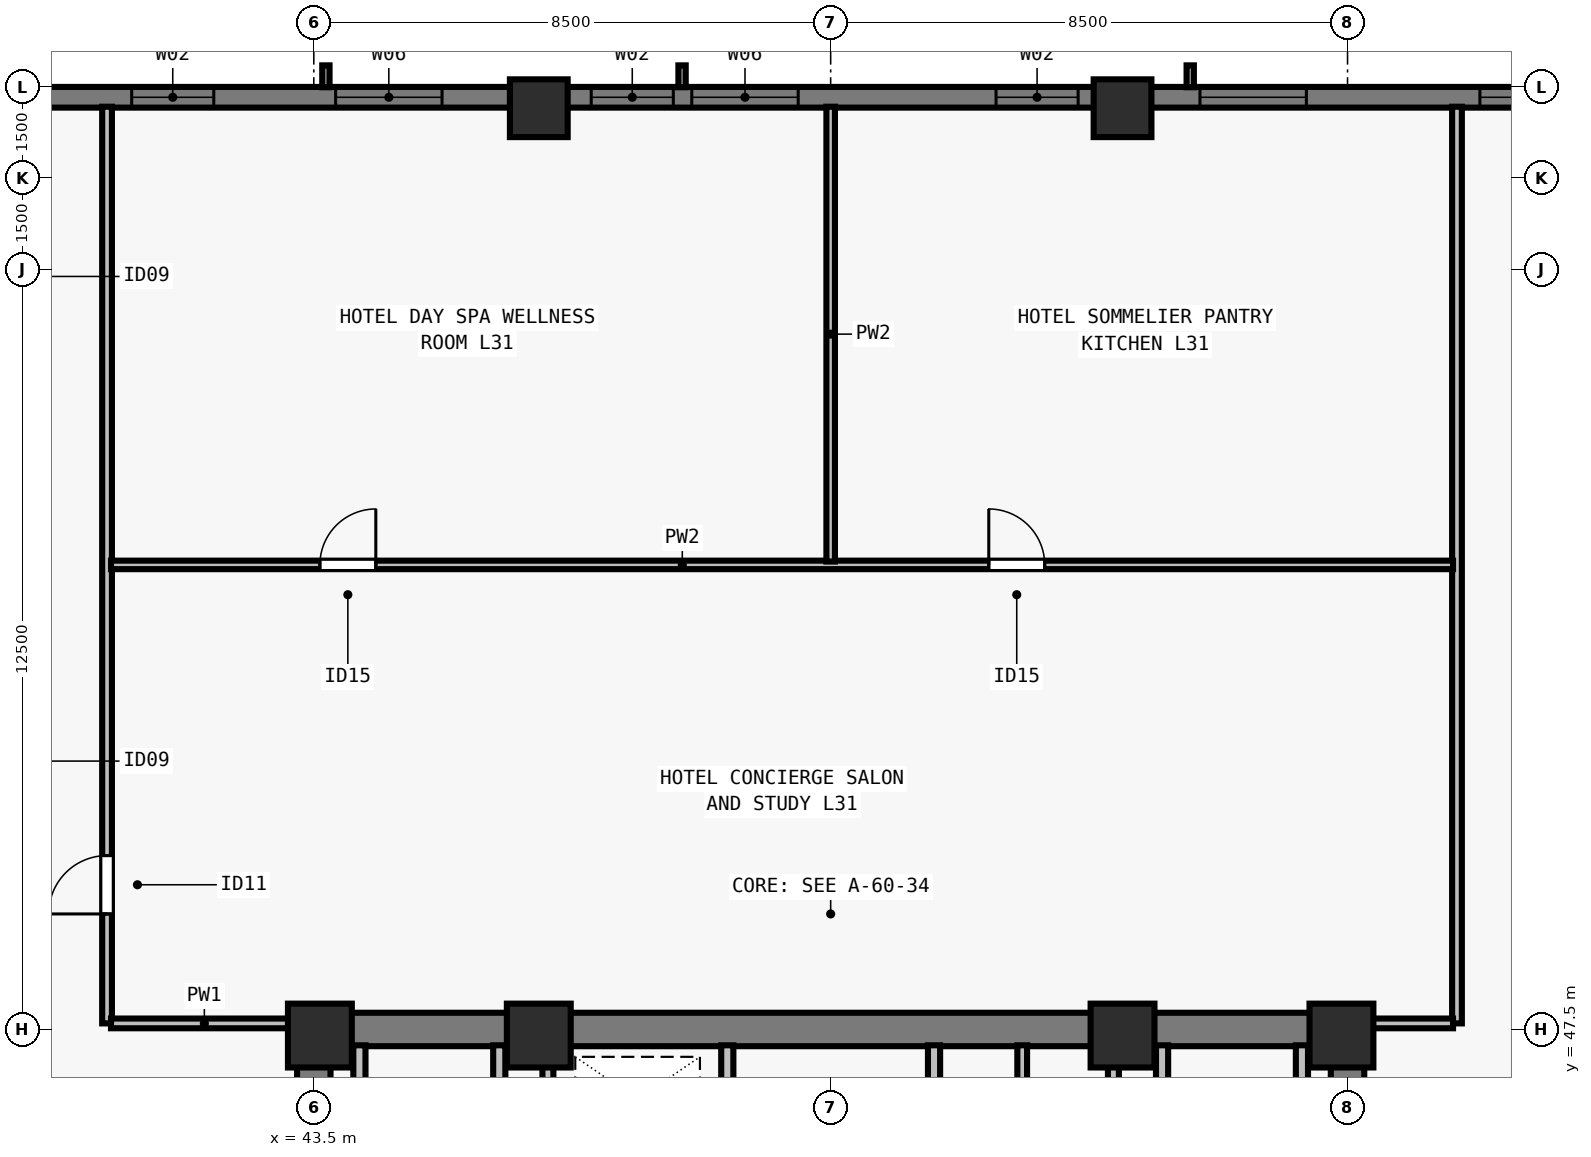
"""IFC4 building model, lengths in metres.
Left out: names, types, materials, properties, quantities, classifications, styles, units other than length and angle.
Written with IfcOpenShell. Run it as: python <this file> out.ifc"""

import sys

from ifc_helpers import new_model, si_unit, direction, frame, frame_2d, origin, origin_2d, place, context, subcontext, project, spatial, rectangle, extrude, element, fill, save


model = new_model("IFC4")
c1 = context("Model", 3, precision=1e-05, world=origin(), true_north=direction((0.0, 1.0)))
c2 = subcontext(c1, "Body", "Model", "MODEL_VIEW")
j1 = project(units=[si_unit("LENGTHUNIT", "METRE"), si_unit("PLANEANGLEUNIT", "RADIAN")], contexts=[c1])
p1 = place(None, origin())
s1 = spatial("IfcSite", under=j1, at=p1, CompositionType="ELEMENT")
p2 = place(p1, origin())
s2 = spatial("IfcBuilding", under=s1, at=p2, CompositionType="ELEMENT")
p3 = place(p2, frame((0.0, 0.0, 116.5)))
s3 = spatial("IfcBuildingStorey", under=s2, at=p3, CompositionType="ELEMENT", Elevation=116.5)
for number, where, z_axis, x_axis in (
    (1, (43.6, 47.4, 0.0), (0.0, 0.0, 1.0), (1.0, 0.0, 0.0)),
    (2, (47.2, 47.4, 0.0), (0.0, 0.0, 1.0), (1.0, 0.0, 0.0)),
    (3, (56.8, 47.4, 0.0), (0.0, 0.0, 1.0), (1.0, 0.0, 0.0)),
    (4, (60.4, 47.4, 0.0), (0.0, 0.0, 1.0), (1.0, 0.0, 0.0)),
):
    element("IfcColumn", number, at=place(p3, frame(where, z_axis=z_axis, x_axis=x_axis)), inside=s3, PredefinedType="COLUMN", context=c2, shape_type="SweptSolid", body=[
        extrude(rectangle(XDim=1.05, YDim=1.05, at=origin_2d()), origin(), (0.0, 0.0, 1.0), 3.5),
    ])
for number, where, z_axis, x_axis in (
    (5, (56.8, 62.65, 0.0), (0.0, 0.0, 1.0), (1.0, 0.0, 0.0)),
    (6, (47.2, 62.65, 0.0), (0.0, 0.0, 1.0), (1.0, 0.0, 0.0)),
):
    element("IfcColumn", number, at=place(p3, frame(where, z_axis=z_axis, x_axis=x_axis)), inside=s3, PredefinedType="COLUMN", context=c2, shape_type="SweptSolid", body=[
        extrude(rectangle(XDim=0.95, YDim=0.95, at=origin_2d()), origin(), (0.0, 0.0, 1.0), 3.5),
    ])
p4 = place(p3, frame((32.0, 62.83, 0.0), z_axis=(0.0, 0.0, 1.0), x_axis=(1.0, 0.0, 0.0)))
e7 = element("IfcWall", 7, at=p4, inside=s3, PredefinedType="SOLIDWALL", context=c2, shape_type="SweptSolid", body=[
    extrude(rectangle(XDim=39.682, YDim=0.34, at=frame_2d((19.841, 0.0))), origin(), (0.0, 0.0, 1.0), 3.28),
])
p5 = place(p4, frame((3.902, 0.0, 0.8)))
e8 = element("IfcOpeningElement", 8, at=p5, cuts=e7, PredefinedType="OPENING", context=c2, shape_type="SweptSolid", body=[
    extrude(rectangle(XDim=1.75, YDim=1.66, at=frame_2d((0.875, 0.83))), frame((0.0, 0.18, 0.0), z_axis=(0.0, -1.0, 0.0), x_axis=(1.0, 0.0, 0.0)), (0.0, 0.0, 1.0), 0.36),
])
p6 = place(p4, frame((8.505, 0.0, 0.8)))
e9 = element("IfcOpeningElement", 9, at=p6, cuts=e7, PredefinedType="OPENING", context=c2, shape_type="SweptSolid", body=[
    extrude(rectangle(XDim=1.35, YDim=1.66, at=frame_2d((0.675, 0.83))), frame((0.0, 0.18, 0.0), z_axis=(0.0, -1.0, 0.0), x_axis=(1.0, 0.0, 0.0)), (0.0, 0.0, 1.0), 0.36),
])
p7 = place(p4, frame((11.859, 0.0, 0.8)))
e10 = element("IfcOpeningElement", 10, at=p7, cuts=e7, PredefinedType="OPENING", context=c2, shape_type="SweptSolid", body=[
    extrude(rectangle(XDim=1.75, YDim=1.66, at=frame_2d((0.875, 0.83))), frame((0.0, 0.18, 0.0), z_axis=(0.0, -1.0, 0.0), x_axis=(1.0, 0.0, 0.0)), (0.0, 0.0, 1.0), 0.36),
])
p8 = place(p4, frame((16.062, 0.0, 0.8)))
e11 = element("IfcOpeningElement", 11, at=p8, cuts=e7, PredefinedType="OPENING", context=c2, shape_type="SweptSolid", body=[
    extrude(rectangle(XDim=1.35, YDim=1.66, at=frame_2d((0.675, 0.83))), frame((0.0, 0.18, 0.0), z_axis=(0.0, -1.0, 0.0), x_axis=(1.0, 0.0, 0.0)), (0.0, 0.0, 1.0), 0.36),
])
p9 = place(p4, frame((17.716, 0.0, 0.8)))
e12 = element("IfcOpeningElement", 12, at=p9, cuts=e7, PredefinedType="OPENING", context=c2, shape_type="SweptSolid", body=[
    extrude(rectangle(XDim=1.75, YDim=1.66, at=frame_2d((0.875, 0.83))), frame((0.0, 0.18, 0.0), z_axis=(0.0, -1.0, 0.0), x_axis=(1.0, 0.0, 0.0)), (0.0, 0.0, 1.0), 0.36),
])
p10 = place(p4, frame((22.719, 0.0, 0.8)))
e13 = element("IfcOpeningElement", 13, at=p10, cuts=e7, PredefinedType="OPENING", context=c2, shape_type="SweptSolid", body=[
    extrude(rectangle(XDim=1.35, YDim=1.66, at=frame_2d((0.675, 0.83))), frame((0.0, 0.18, 0.0), z_axis=(0.0, -1.0, 0.0), x_axis=(1.0, 0.0, 0.0)), (0.0, 0.0, 1.0), 0.36),
])
p11 = place(p4, frame((26.073, 0.0, 0.8)))
e14 = element("IfcOpeningElement", 14, at=p11, cuts=e7, PredefinedType="OPENING", context=c2, shape_type="SweptSolid", body=[
    extrude(rectangle(XDim=1.75, YDim=1.66, at=frame_2d((0.875, 0.83))), frame((0.0, 0.18, 0.0), z_axis=(0.0, -1.0, 0.0), x_axis=(1.0, 0.0, 0.0)), (0.0, 0.0, 1.0), 0.36),
])
p12 = place(p4, frame((30.677, 0.0, 0.8)))
e15 = element("IfcOpeningElement", 15, at=p12, cuts=e7, PredefinedType="OPENING", context=c2, shape_type="SweptSolid", body=[
    extrude(rectangle(XDim=1.35, YDim=1.66, at=frame_2d((0.675, 0.83))), frame((0.0, 0.18, 0.0), z_axis=(0.0, -1.0, 0.0), x_axis=(1.0, 0.0, 0.0)), (0.0, 0.0, 1.0), 0.36),
])
p13 = place(p4, frame((33.18, 0.0, 0.8)))
e16 = element("IfcOpeningElement", 16, at=p13, cuts=e7, PredefinedType="OPENING", context=c2, shape_type="SweptSolid", body=[
    extrude(rectangle(XDim=1.75, YDim=1.66, at=frame_2d((0.875, 0.83))), frame((0.0, 0.18, 0.0), z_axis=(0.0, -1.0, 0.0), x_axis=(1.0, 0.0, 0.0)), (0.0, 0.0, 1.0), 0.36),
])
p14 = place(p3, frame((43.225, 47.5, 0.0), z_axis=(0.0, 0.0, 1.0), x_axis=(1.0, 0.0, 0.0)))
e17 = element("IfcWall", 17, at=p14, inside=s3, PredefinedType="SHEAR", context=c2, shape_type="SweptSolid", body=[
    extrude(rectangle(XDim=17.55, YDim=0.55, at=frame_2d((8.775, 0.0))), origin(), (0.0, 0.0, 1.0), 3.28),
])
for number, where, z_axis, x_axis in (
    (18, (43.5, 40.8, 0.0), (0.0, 0.0, 1.0), (0.0, 1.0, 0.0)),
    (19, (60.5, 40.8, 0.0), (0.0, 0.0, 1.0), (0.0, 1.0, 0.0)),
):
    element("IfcWall", number, at=place(p3, frame(where, z_axis=z_axis, x_axis=x_axis)), inside=s3, PredefinedType="SHEAR", context=c2, shape_type="SweptSolid", body=[
        extrude(rectangle(XDim=6.435, YDim=0.55, at=frame_2d((3.218, 0.0))), origin(), (0.0, 0.0, 1.0), 3.28),
    ])
p15 = place(p3, frame((50.3, 40.585, 0.0), z_axis=(0.0, 0.0, 1.0), x_axis=(0.0, 1.0, 0.0)))
e20 = element("IfcWall", 20, at=p15, inside=s3, PredefinedType="SOLIDWALL", context=c2, shape_type="SweptSolid", body=[
    extrude(rectangle(XDim=6.655, YDim=0.2, at=frame_2d((3.328, 0.0))), origin(), (0.0, 0.0, 1.0), 3.28),
])
p16 = place(p15, frame((5.065, 0.0, 0.0)))
e21 = element("IfcOpeningElement", 21, at=p16, cuts=e20, PredefinedType="OPENING", context=c2, shape_type="SweptSolid", body=[
    extrude(rectangle(XDim=0.8, YDim=2.08, at=frame_2d((0.4, 1.04))), frame((0.0, 0.11, 0.0), z_axis=(0.0, -1.0, 0.0), x_axis=(1.0, 0.0, 0.0)), (0.0, 0.0, 1.0), 0.22),
])
p17 = place(p3, frame((53.7, 40.585, 0.0), z_axis=(0.0, 0.0, 1.0), x_axis=(0.0, 1.0, 0.0)))
e22 = element("IfcWall", 22, at=p17, inside=s3, PredefinedType="SOLIDWALL", context=c2, shape_type="SweptSolid", body=[
    extrude(rectangle(XDim=6.655, YDim=0.2, at=frame_2d((3.328, 0.0))), origin(), (0.0, 0.0, 1.0), 3.28),
])
p18 = place(p17, frame((0.195, 0.0, 0.0)))
e23 = element("IfcOpeningElement", 23, at=p18, cuts=e22, PredefinedType="OPENING", context=c2, shape_type="SweptSolid", body=[
    extrude(rectangle(XDim=0.8, YDim=2.08, at=frame_2d((0.4, 1.04))), frame((0.0, 0.11, 0.0), z_axis=(0.0, -1.0, 0.0), x_axis=(1.0, 0.0, 0.0)), (0.0, 0.0, 1.0), 0.22),
])
p19 = place(p17, frame((4.265, 0.0, 0.0)))
e24 = element("IfcOpeningElement", 24, at=p19, cuts=e22, PredefinedType="OPENING", context=c2, shape_type="SweptSolid", body=[
    extrude(rectangle(XDim=0.95, YDim=2.12, at=frame_2d((0.475, 1.06))), frame((0.0, 0.11, 0.0), z_axis=(0.0, -1.0, 0.0), x_axis=(1.0, 0.0, 0.0)), (0.0, 0.0, 1.0), 0.22),
])
for number, where, z_axis, x_axis in (
    (25, (46.55, 43.735, 0.0), (0.0, 0.0, 1.0), (0.0, 1.0, 0.0)),
    (26, (44.25, 43.735, 0.0), (0.0, 0.0, 1.0), (0.0, 1.0, 0.0)),
    (27, (57.45, 43.735, 0.0), (0.0, 0.0, 1.0), (0.0, 1.0, 0.0)),
    (28, (59.75, 43.735, 0.0), (0.0, 0.0, 1.0), (0.0, 1.0, 0.0)),
):
    element("IfcWall", number, at=place(p3, frame(where, z_axis=z_axis, x_axis=x_axis)), inside=s3, PredefinedType="SOLIDWALL", context=c2, shape_type="SweptSolid", body=[
        extrude(rectangle(XDim=3.505, YDim=0.2, at=frame_2d((1.752, 0.0))), origin(), (0.0, 0.0, 1.0), 3.28),
    ])
for number, where, z_axis, x_axis in (
    (29, (47.35, 43.735, 0.0), (0.0, 0.0, 1.0), (0.0, 1.0, 0.0)),
    (30, (56.65, 43.735, 0.0), (0.0, 0.0, 1.0), (0.0, 1.0, 0.0)),
):
    element("IfcWall", number, at=place(p3, frame(where, z_axis=z_axis, x_axis=x_axis)), inside=s3, PredefinedType="SOLIDWALL", context=c2, shape_type="SweptSolid", body=[
        extrude(rectangle(XDim=3.505, YDim=0.18, at=frame_2d((1.752, 0.0))), origin(), (0.0, 0.0, 1.0), 3.28),
    ])
p20 = place(p3, frame((55.15, 44.195, 0.0), z_axis=(0.0, 0.0, 1.0), x_axis=(0.0, 1.0, 0.0)))
e31 = element("IfcWall", 31, at=p20, inside=s3, PredefinedType="PARTITIONING", context=c2, shape_type="SweptSolid", body=[
    extrude(rectangle(XDim=3.045, YDim=0.16, at=frame_2d((1.522, 0.0))), origin(), (0.0, 0.0, 1.0), 3.28),
])
p21 = place(p20, frame((1.025, 0.0, 0.0)))
e32 = element("IfcOpeningElement", 32, at=p21, cuts=e31, PredefinedType="OPENING", context=c2, shape_type="SweptSolid", body=[
    extrude(rectangle(XDim=0.8, YDim=2.1, at=frame_2d((0.4, 1.05))), frame((0.0, 0.09, 0.0), z_axis=(0.0, -1.0, 0.0), x_axis=(1.0, 0.0, 0.0)), (0.0, 0.0, 1.0), 0.18),
])
p22 = place(p3, frame((40.1, 47.6, 0.0), z_axis=(0.0, 0.0, 1.0), x_axis=(0.0, 1.0, 0.0)))
e33 = element("IfcWall", 33, at=p22, inside=s3, PredefinedType="PARTITIONING", context=c2, shape_type="SweptSolid", body=[
    extrude(rectangle(XDim=15.075, YDim=0.16, at=frame_2d((7.538, 0.0))), origin(), (0.0, 0.0, 1.0), 2.555),
])
p23 = place(p22, frame((1.8, 0.0, 0.0)))
e34 = element("IfcOpeningElement", 34, at=p23, cuts=e33, PredefinedType="OPENING", context=c2, shape_type="SweptSolid", body=[
    extrude(rectangle(XDim=0.96, YDim=2.12, at=frame_2d((0.48, 1.06))), frame((0.0, 0.09, 0.0), z_axis=(0.0, -1.0, 0.0), x_axis=(1.0, 0.0, 0.0)), (0.0, 0.0, 1.0), 0.18),
])
p24 = place(p3, frame((40.165, 47.6, 0.0), z_axis=(0.0, 0.0, 1.0), x_axis=(1.0, 0.0, 0.0)))
e35 = element("IfcWall", 35, at=p24, inside=s3, PredefinedType="PARTITIONING", context=c2, shape_type="SweptSolid", body=[
    extrude(rectangle(XDim=3.07, YDim=0.16, at=frame_2d((1.535, 0.0))), origin(), (0.0, 0.0, 1.0), 3.28),
])
p25 = place(p3, frame((62.3, 47.6, 0.0), z_axis=(0.0, 0.0, 1.0), x_axis=(0.0, 1.0, 0.0)))
e36 = element("IfcWall", 36, at=p25, inside=s3, PredefinedType="PARTITIONING", context=c2, shape_type="SweptSolid", body=[
    extrude(rectangle(XDim=15.075, YDim=0.16, at=frame_2d((7.538, 0.0))), origin(), (0.0, 0.0, 1.0), 2.555),
])
p26 = place(p3, frame((60.765, 47.6, 0.0), z_axis=(0.0, 0.0, 1.0), x_axis=(1.0, 0.0, 0.0)))
e37 = element("IfcWall", 37, at=p26, inside=s3, PredefinedType="PARTITIONING", context=c2, shape_type="SweptSolid", body=[
    extrude(rectangle(XDim=1.47, YDim=0.16, at=frame_2d((0.735, 0.0))), origin(), (0.0, 0.0, 1.0), 3.28),
])
p27 = place(p3, frame((40.165, 55.14, 0.0), z_axis=(0.0, 0.0, 1.0), x_axis=(1.0, 0.0, 0.0)))
e38 = element("IfcWall", 38, at=p27, inside=s3, PredefinedType="PARTITIONING", context=c2, shape_type="SweptSolid", body=[
    extrude(rectangle(XDim=22.07, YDim=0.14, at=frame_2d((11.035, 0.0))), origin(), (0.0, 0.0, 1.0), 3.28),
])
p28 = place(p27, frame((3.435, 0.0, 0.0)))
e39 = element("IfcOpeningElement", 39, at=p28, cuts=e38, PredefinedType="OPENING", context=c2, shape_type="SweptSolid", body=[
    extrude(rectangle(XDim=0.92, YDim=2.12, at=frame_2d((0.46, 1.06))), frame((0.0, 0.08, 0.0), z_axis=(0.0, -1.0, 0.0), x_axis=(1.0, 0.0, 0.0)), (0.0, 0.0, 1.0), 0.16),
])
p29 = place(p27, frame((14.435, 0.0, 0.0)))
e40 = element("IfcOpeningElement", 40, at=p29, cuts=e38, PredefinedType="OPENING", context=c2, shape_type="SweptSolid", body=[
    extrude(rectangle(XDim=0.92, YDim=2.12, at=frame_2d((0.46, 1.06))), frame((0.0, 0.08, 0.0), z_axis=(0.0, -1.0, 0.0), x_axis=(1.0, 0.0, 0.0)), (0.0, 0.0, 1.0), 0.16),
])
p30 = place(p3, frame((52.0, 55.195, 0.0), z_axis=(0.0, 0.0, 1.0), x_axis=(0.0, 1.0, 0.0)))
e41 = element("IfcWall", 41, at=p30, inside=s3, PredefinedType="PARTITIONING", context=c2, shape_type="SweptSolid", body=[
    extrude(rectangle(XDim=7.48, YDim=0.14, at=frame_2d((3.74, 0.0))), origin(), (0.0, 0.0, 1.0), 3.28),
])
p31 = place(p6, origin())
e42 = element("IfcWindow", 42, at=p31, inside=s3, PartitioningType="SINGLE_PANEL", PredefinedType="WINDOW", context=c2, shape_type="SweptSolid", body=[
    extrude(rectangle(XDim=1.35, YDim=1.66, at=frame_2d((0.675, 0.83))), frame((0.0, -0.05, 0.0), z_axis=(0.0, -1.0, 0.0), x_axis=(1.0, 0.0, 0.0)), (0.0, 0.0, 1.0), 0.06),
])
fill(e9, e42)
p32 = place(p7, origin())
e43 = element("IfcWindow", 43, at=p32, inside=s3, PartitioningType="SINGLE_PANEL", PredefinedType="WINDOW", context=c2, shape_type="SweptSolid", body=[
    extrude(rectangle(XDim=1.75, YDim=1.66, at=frame_2d((0.875, 0.83))), frame((0.0, -0.05, 0.0), z_axis=(0.0, -1.0, 0.0), x_axis=(1.0, 0.0, 0.0)), (0.0, 0.0, 1.0), 0.06),
])
fill(e10, e43)
p33 = place(p8, origin())
e44 = element("IfcWindow", 44, at=p33, inside=s3, PartitioningType="SINGLE_PANEL", PredefinedType="WINDOW", context=c2, shape_type="SweptSolid", body=[
    extrude(rectangle(XDim=1.35, YDim=1.66, at=frame_2d((0.675, 0.83))), frame((0.0, -0.05, 0.0), z_axis=(0.0, -1.0, 0.0), x_axis=(1.0, 0.0, 0.0)), (0.0, 0.0, 1.0), 0.06),
])
fill(e11, e44)
p34 = place(p9, origin())
e45 = element("IfcWindow", 45, at=p34, inside=s3, PartitioningType="SINGLE_PANEL", PredefinedType="WINDOW", context=c2, shape_type="SweptSolid", body=[
    extrude(rectangle(XDim=1.75, YDim=1.66, at=frame_2d((0.875, 0.83))), frame((0.0, -0.05, 0.0), z_axis=(0.0, -1.0, 0.0), x_axis=(1.0, 0.0, 0.0)), (0.0, 0.0, 1.0), 0.06),
])
fill(e12, e45)
p35 = place(p10, origin())
e46 = element("IfcWindow", 46, at=p35, inside=s3, PartitioningType="SINGLE_PANEL", PredefinedType="WINDOW", context=c2, shape_type="SweptSolid", body=[
    extrude(rectangle(XDim=1.35, YDim=1.66, at=frame_2d((0.675, 0.83))), frame((0.0, -0.05, 0.0), z_axis=(0.0, -1.0, 0.0), x_axis=(1.0, 0.0, 0.0)), (0.0, 0.0, 1.0), 0.06),
])
fill(e13, e46)
p36 = place(p11, origin())
e47 = element("IfcWindow", 47, at=p36, inside=s3, PartitioningType="SINGLE_PANEL", PredefinedType="WINDOW", context=c2, shape_type="SweptSolid", body=[
    extrude(rectangle(XDim=1.75, YDim=1.66, at=frame_2d((0.875, 0.83))), frame((0.0, -0.05, 0.0), z_axis=(0.0, -1.0, 0.0), x_axis=(1.0, 0.0, 0.0)), (0.0, 0.0, 1.0), 0.06),
])
fill(e14, e47)
p37 = place(p12, origin())
e48 = element("IfcWindow", 48, at=p37, inside=s3, PartitioningType="SINGLE_PANEL", PredefinedType="WINDOW", context=c2, shape_type="SweptSolid", body=[
    extrude(rectangle(XDim=1.35, YDim=1.66, at=frame_2d((0.675, 0.83))), frame((0.0, -0.05, 0.0), z_axis=(0.0, -1.0, 0.0), x_axis=(1.0, 0.0, 0.0)), (0.0, 0.0, 1.0), 0.06),
])
fill(e15, e48)
p38 = place(p23, origin())
e49 = element("IfcDoor", 49, at=p38, inside=s3, OperationType="SINGLE_SWING_LEFT", PredefinedType="DOOR", context=c2, shape_type="SweptSolid", body=[
    extrude(rectangle(XDim=0.96, YDim=2.12, at=frame_2d((0.48, 1.06))), frame((0.0, 0.025, 0.0), z_axis=(0.0, -1.0, 0.0), x_axis=(1.0, 0.0, 0.0)), (0.0, 0.0, 1.0), 0.05),
])
fill(e34, e49)
p39 = place(p28, origin())
e50 = element("IfcDoor", 50, at=p39, inside=s3, OperationType="SINGLE_SWING_RIGHT", PredefinedType="DOOR", context=c2, shape_type="SweptSolid", body=[
    extrude(rectangle(XDim=0.92, YDim=2.12, at=frame_2d((0.46, 1.06))), frame((0.0, 0.025, 0.0), z_axis=(0.0, -1.0, 0.0), x_axis=(1.0, 0.0, 0.0)), (0.0, 0.0, 1.0), 0.05),
])
fill(e39, e50)
p40 = place(p29, origin())
e51 = element("IfcDoor", 51, at=p40, inside=s3, OperationType="SINGLE_SWING_LEFT", PredefinedType="DOOR", context=c2, shape_type="SweptSolid", body=[
    extrude(rectangle(XDim=0.92, YDim=2.12, at=frame_2d((0.46, 1.06))), frame((0.0, 0.025, 0.0), z_axis=(0.0, -1.0, 0.0), x_axis=(1.0, 0.0, 0.0)), (0.0, 0.0, 1.0), 0.05),
])
fill(e40, e51)
save(model, sys.argv[1])
